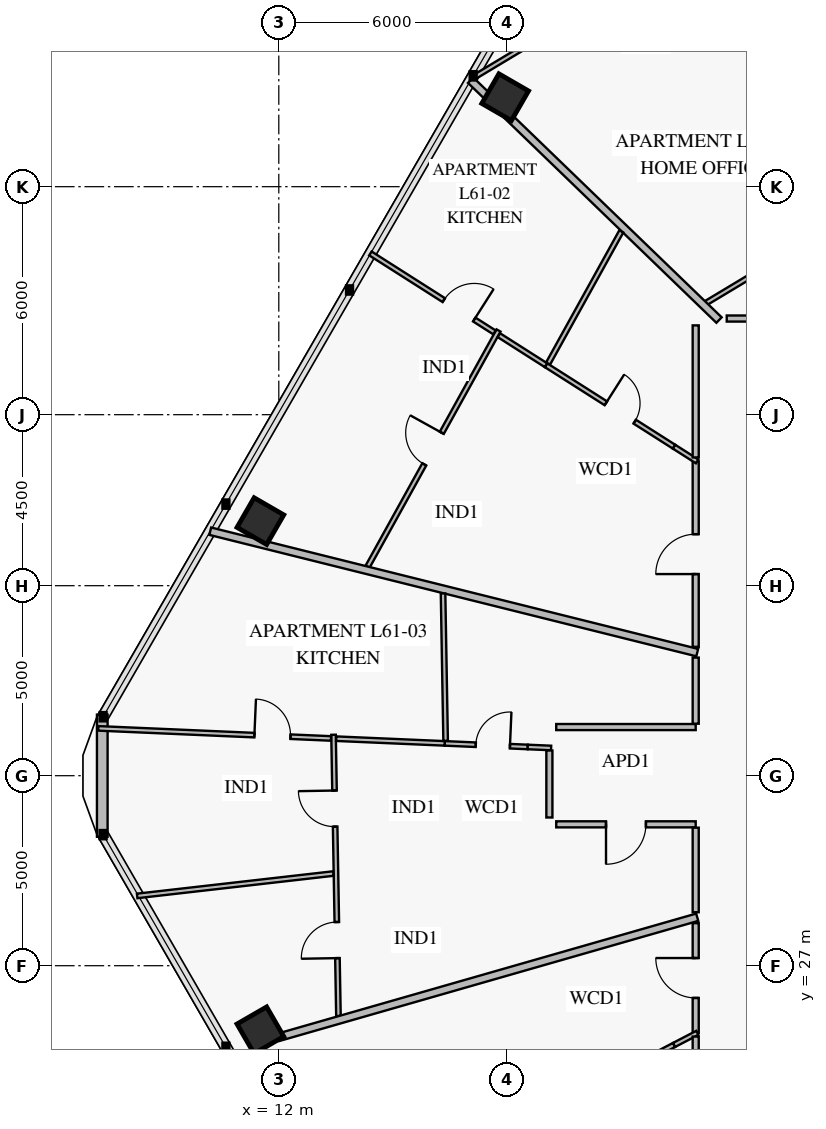
"""IFC4 building model, lengths in metres.
Left out: names, types, materials, properties, quantities, classifications, styles, units other than length and angle.
Written with IfcOpenShell. Run it as: python <this file> out.ifc"""

import sys

from ifc_helpers import new_model, si_unit, direction, frame, frame_2d, origin, origin_2d, place, context, subcontext, project, spatial, rectangle, extrude, element, fill, save


model = new_model("IFC4")
c1 = context("Model", 3, precision=1e-05, world=origin(), true_north=direction((0.0, 1.0)))
c2 = subcontext(c1, "Body", "Model", "MODEL_VIEW")
j1 = project(units=[si_unit("LENGTHUNIT", "METRE"), si_unit("PLANEANGLEUNIT", "RADIAN")], contexts=[c1])
p1 = place(None, origin())
s1 = spatial("IfcSite", under=j1, at=p1, CompositionType="ELEMENT")
p2 = place(p1, origin())
s2 = spatial("IfcBuilding", under=s1, at=p2, CompositionType="ELEMENT")
p3 = place(p2, frame((0.0, 0.0, 242.6)))
s3 = spatial("IfcBuildingStorey", under=s2, at=p3, CompositionType="ELEMENT", Elevation=242.6)
for number, where, z_axis, x_axis in (
    (1, (17.956, 49.855, 0.0), (0.0, 0.0, 1.0), (-0.5, -0.866, 0.0)),
    (2, (11.515, 38.699, 0.0), (0.0, 0.0, 1.0), (-0.5, -0.866, 0.0)),
    (3, (11.515, 25.301, 0.0), (0.0, 0.0, 1.0), (0.5, -0.866, 0.0)),
):
    element("IfcColumn", number, at=place(p3, frame(where, z_axis=z_axis, x_axis=x_axis)), inside=s3, PredefinedType="COLUMN", context=c2, shape_type="SweptSolid", body=[
        extrude(rectangle(XDim=0.9, YDim=0.9, at=origin_2d()), origin(), (0.0, 0.0, 1.0), 3.55),
    ])
p4 = place(p3, frame((7.355, 30.393, 0.0), z_axis=(0.0, 0.0, 1.0), x_axis=(0.0, 1.0, 0.0)))
e4 = element("IfcWall", 4, at=p4, inside=s3, PredefinedType="SOLIDWALL", context=c2, shape_type="SweptSolid", body=[
    extrude(rectangle(XDim=3.215, YDim=0.28, at=frame_2d((1.607, 0.0))), origin(), (0.0, 0.0, 1.0), 3.55),
])
p5 = place(p3, frame((28.011, 47.333, 0.0), z_axis=(0.0, 0.0, 1.0), x_axis=(-0.46205322058, 0.886852198143, 0.0)))
e5 = element("IfcWall", 5, at=p5, inside=s3, PredefinedType="PARTITIONING", context=c2, shape_type="SweptSolid", body=[
    extrude(rectangle(XDim=8.251, YDim=0.12, at=frame_2d((4.125, 0.0))), origin(), (0.0, 0.0, 1.0), 2.93),
])
p6 = place(p5, frame((3.625, 0.0, 0.0)))
e6 = element("IfcOpeningElement", 6, at=p6, cuts=e5, PredefinedType="OPENING", context=c2, shape_type="SweptSolid", body=[
    extrude(rectangle(XDim=0.95, YDim=2.1, at=frame_2d((0.475, 1.05))), frame((0.0, 0.072, 0.0), z_axis=(0.0, -1.0, 0.0), x_axis=(1.0, 0.0, 0.0)), (0.0, 0.0, 1.0), 0.144),
])
p7 = place(p3, frame((24.152, 54.593, 0.0), z_axis=(0.0, 0.0, 1.0), x_axis=(-0.857165830908, -0.51504052105, 0.0)))
e7 = element("IfcWall", 7, at=p7, inside=s3, PredefinedType="PARTITIONING", context=c2, shape_type="SweptSolid", body=[
    extrude(rectangle(XDim=8.171, YDim=0.12, at=frame_2d((4.085, 0.0))), origin(), (0.0, 0.0, 1.0), 3.122),
])
p8 = place(p7, frame((2.866, 0.0, 0.0)))
e8 = element("IfcOpeningElement", 8, at=p8, cuts=e7, PredefinedType="OPENING", context=c2, shape_type="SweptSolid", body=[
    extrude(rectangle(XDim=0.95, YDim=2.1, at=frame_2d((0.475, 1.05))), frame((0.0, 0.072, 0.0), z_axis=(0.0, -1.0, 0.0), x_axis=(1.0, 0.0, 0.0)), (0.0, 0.0, 1.0), 0.144),
])
p9 = place(p3, frame((17.781, 43.716, 0.0), z_axis=(0.0, 0.0, 1.0), x_axis=(-0.484799862098, -0.874625116098, 0.0)))
e9 = element("IfcWall", 9, at=p9, inside=s3, PredefinedType="PARTITIONING", context=c2, shape_type="SweptSolid", body=[
    extrude(rectangle(XDim=7.108, YDim=0.12, at=frame_2d((3.554, 0.0))), origin(), (0.0, 0.0, 1.0), 2.95),
])
p10 = place(p9, frame((3.079, 0.0, 0.0)))
e10 = element("IfcOpeningElement", 10, at=p10, cuts=e9, PredefinedType="OPENING", context=c2, shape_type="SweptSolid", body=[
    extrude(rectangle(XDim=0.95, YDim=2.1, at=frame_2d((0.475, 1.05))), frame((0.0, 0.072, 0.0), z_axis=(0.0, -1.0, 0.0), x_axis=(1.0, 0.0, 0.0)), (0.0, 0.0, 1.0), 0.144),
])
p11 = place(p3, frame((22.4, 40.657, 0.0), z_axis=(0.0, 0.0, 1.0), x_axis=(-0.843568310758, 0.537021885109, 0.0)))
e11 = element("IfcWall", 11, at=p11, inside=s3, PredefinedType="PARTITIONING", context=c2, shape_type="SweptSolid", body=[
    extrude(rectangle(XDim=3.992, YDim=0.12, at=frame_2d((1.996, 0.0))), origin(), (0.0, 0.0, 1.0), 3.15),
])
p12 = place(p11, frame((1.227, 0.0, 0.0)))
e12 = element("IfcOpeningElement", 12, at=p12, cuts=e11, PredefinedType="OPENING", context=c2, shape_type="SweptSolid", body=[
    extrude(rectangle(XDim=0.9, YDim=2.1, at=frame_2d((0.45, 1.05))), frame((0.0, 0.072, 0.0), z_axis=(0.0, -1.0, 0.0), x_axis=(1.0, 0.0, 0.0)), (0.0, 0.0, 1.0), 0.144),
])
p13 = place(p3, frame((19.032, 42.802, 0.0), z_axis=(0.0, 0.0, 1.0), x_axis=(-0.843627335813, 0.536929155727, 0.0)))
e13 = element("IfcWall", 13, at=p13, inside=s3, PredefinedType="PARTITIONING", context=c2, shape_type="SweptSolid", body=[
    extrude(rectangle(XDim=1.472, YDim=0.12, at=frame_2d((0.736, 0.0))), origin(), (0.0, 0.0, 1.0), 3.55),
])
p14 = place(p3, frame((17.676, 43.665, 0.0), z_axis=(0.0, 0.0, 1.0), x_axis=(-0.843578359507, 0.537006099939, 0.0)))
e14 = element("IfcWall", 14, at=p14, inside=s3, PredefinedType="PARTITIONING", context=c2, shape_type="SweptSolid", body=[
    extrude(rectangle(XDim=3.87, YDim=0.12, at=frame_2d((1.935, 0.0))), origin(), (0.0, 0.0, 1.0), 2.93),
])
p15 = place(p14, frame((0.631, 0.0, 0.0)))
e15 = element("IfcOpeningElement", 15, at=p15, cuts=e14, PredefinedType="OPENING", context=c2, shape_type="SweptSolid", body=[
    extrude(rectangle(XDim=0.95, YDim=2.1, at=frame_2d((0.475, 1.05))), frame((0.0, 0.072, 0.0), z_axis=(0.0, -1.0, 0.0), x_axis=(1.0, 0.0, 0.0)), (0.0, 0.0, 1.0), 0.144),
])
p16 = place(p3, frame((22.97, 40.271, 0.0), z_axis=(0.0, 0.0, 1.0), x_axis=(0.0, -1.0, 0.0)))
e16 = element("IfcWall", 16, at=p16, inside=s3, PredefinedType="PARTITIONING", context=c2, shape_type="SweptSolid", body=[
    extrude(rectangle(XDim=4.881, YDim=0.16, at=frame_2d((2.44, 0.0))), origin(), (0.0, 0.0, 1.0), 2.95),
])
p17 = place(p16, frame((1.915, 0.0, 0.0)))
e17 = element("IfcOpeningElement", 17, at=p17, cuts=e16, PredefinedType="OPENING", context=c2, shape_type="SweptSolid", body=[
    extrude(rectangle(XDim=1.05, YDim=2.15, at=frame_2d((0.525, 1.075))), frame((0.0, 0.092, 0.0), z_axis=(0.0, -1.0, 0.0), x_axis=(1.0, 0.0, 0.0)), (0.0, 0.0, 1.0), 0.184),
])
p18 = place(p3, frame((13.44, 33.077, 0.0), z_axis=(0.0, 0.0, 1.0), x_axis=(0.01747984643, -0.999847215813, 0.0)))
e18 = element("IfcWall", 18, at=p18, inside=s3, PredefinedType="PARTITIONING", context=c2, shape_type="SweptSolid", body=[
    extrude(rectangle(XDim=7.403, YDim=0.12, at=frame_2d((3.701, 0.0))), origin(), (0.0, 0.0, 1.0), 2.95),
])
p19 = place(p18, frame((1.468, 0.0, 0.0)))
e19 = element("IfcOpeningElement", 19, at=p19, cuts=e18, PredefinedType="OPENING", context=c2, shape_type="SweptSolid", body=[
    extrude(rectangle(XDim=0.95, YDim=2.1, at=frame_2d((0.475, 1.05))), frame((0.0, 0.072, 0.0), z_axis=(0.0, -1.0, 0.0), x_axis=(1.0, 0.0, 0.0)), (0.0, 0.0, 1.0), 0.144),
])
p20 = place(p18, frame((4.929, 0.0, 0.0)))
e20 = element("IfcOpeningElement", 20, at=p20, cuts=e18, PredefinedType="OPENING", context=c2, shape_type="SweptSolid", body=[
    extrude(rectangle(XDim=0.95, YDim=2.1, at=frame_2d((0.475, 1.05))), frame((0.0, 0.072, 0.0), z_axis=(0.0, -1.0, 0.0), x_axis=(1.0, 0.0, 0.0)), (0.0, 0.0, 1.0), 0.144),
])
p21 = place(p3, frame((18.55, 32.756, 0.0), z_axis=(0.0, 0.0, 1.0), x_axis=(-0.999065825158, 0.04321431478, 0.0)))
e21 = element("IfcWall", 21, at=p21, inside=s3, PredefinedType="PARTITIONING", context=c2, shape_type="SweptSolid", body=[
    extrude(rectangle(XDim=2.186, YDim=0.12, at=frame_2d((1.093, 0.0))), origin(), (0.0, 0.0, 1.0), 3.55),
])
p22 = place(p21, frame((0.468, 0.0, 0.0)))
e22 = element("IfcOpeningElement", 22, at=p22, cuts=e21, PredefinedType="OPENING", context=c2, shape_type="SweptSolid", body=[
    extrude(rectangle(XDim=0.9, YDim=2.1, at=frame_2d((0.45, 1.05))), frame((0.0, 0.072, 0.0), z_axis=(0.0, -1.0, 0.0), x_axis=(1.0, 0.0, 0.0)), (0.0, 0.0, 1.0), 0.144),
])
p23 = place(p3, frame((16.366, 32.85, 0.0), z_axis=(0.0, 0.0, 1.0), x_axis=(-0.999061951001, 0.043303788079, 0.0)))
e23 = element("IfcWall", 23, at=p23, inside=s3, PredefinedType="PARTITIONING", context=c2, shape_type="SweptSolid", body=[
    extrude(rectangle(XDim=2.858, YDim=0.12, at=frame_2d((1.429, 0.0))), origin(), (0.0, 0.0, 1.0), 3.55),
])
p24 = place(p3, frame((13.374, 32.98, 0.0), z_axis=(0.0, 0.0, 1.0), x_axis=(-0.999064479772, 0.043245407351, 0.0)))
e24 = element("IfcWall", 24, at=p24, inside=s3, PredefinedType="PARTITIONING", context=c2, shape_type="SweptSolid", body=[
    extrude(rectangle(XDim=6.131, YDim=0.12, at=frame_2d((3.065, 0.0))), origin(), (0.0, 0.0, 1.0), 2.93),
])
p25 = place(p24, frame((1.068, 0.0, 0.0)))
e25 = element("IfcOpeningElement", 25, at=p25, cuts=e24, PredefinedType="OPENING", context=c2, shape_type="SweptSolid", body=[
    extrude(rectangle(XDim=0.95, YDim=2.1, at=frame_2d((0.475, 1.05))), frame((0.0, 0.072, 0.0), z_axis=(0.0, -1.0, 0.0), x_axis=(1.0, 0.0, 0.0)), (0.0, 0.0, 1.0), 0.144),
])
p26 = place(p3, frame((19.3, 30.72, 0.0), z_axis=(0.0, 0.0, 1.0), x_axis=(1.0, 0.0, 0.0)))
e26 = element("IfcWall", 26, at=p26, inside=s3, PredefinedType="PARTITIONING", context=c2, shape_type="SweptSolid", body=[
    extrude(rectangle(XDim=3.67, YDim=0.16, at=frame_2d((1.835, 0.0))), origin(), (0.0, 0.0, 1.0), 3.55),
])
p27 = place(p26, frame((1.31, 0.0, 0.0)))
e27 = element("IfcOpeningElement", 27, at=p27, cuts=e26, PredefinedType="OPENING", context=c2, shape_type="SweptSolid", body=[
    extrude(rectangle(XDim=1.05, YDim=2.15, at=frame_2d((0.525, 1.075))), frame((0.0, 0.092, 0.0), z_axis=(0.0, -1.0, 0.0), x_axis=(1.0, 0.0, 0.0)), (0.0, 0.0, 1.0), 0.184),
])
p28 = place(p3, frame((22.4, 24.914, 0.0), z_axis=(0.0, 0.0, 1.0), x_axis=(-0.886792724396, -0.462167354926, 0.0)))
e28 = element("IfcWall", 28, at=p28, inside=s3, PredefinedType="PARTITIONING", context=c2, shape_type="SweptSolid", body=[
    extrude(rectangle(XDim=2.01, YDim=0.12, at=frame_2d((1.005, 0.0))), origin(), (0.0, 0.0, 1.0), 3.55),
])
p29 = place(p28, frame((0.394, 0.0, 0.0)))
e29 = element("IfcOpeningElement", 29, at=p29, cuts=e28, PredefinedType="OPENING", context=c2, shape_type="SweptSolid", body=[
    extrude(rectangle(XDim=0.9, YDim=2.1, at=frame_2d((0.45, 1.05))), frame((0.0, 0.072, 0.0), z_axis=(0.0, -1.0, 0.0), x_axis=(1.0, 0.0, 0.0)), (0.0, 0.0, 1.0), 0.144),
])
p30 = place(p3, frame((22.97, 28.119, 0.0), z_axis=(0.0, 0.0, 1.0), x_axis=(0.0, -1.0, 0.0)))
e30 = element("IfcWall", 30, at=p30, inside=s3, PredefinedType="PARTITIONING", context=c2, shape_type="SweptSolid", body=[
    extrude(rectangle(XDim=2.885, YDim=0.16, at=frame_2d((1.443, 0.0))), origin(), (0.0, 0.0, 1.0), 3.55),
])
p31 = place(p30, frame((0.918, 0.0, 0.0)))
e31 = element("IfcOpeningElement", 31, at=p31, cuts=e30, PredefinedType="OPENING", context=c2, shape_type="SweptSolid", body=[
    extrude(rectangle(XDim=1.05, YDim=2.15, at=frame_2d((0.525, 1.075))), frame((0.0, 0.092, 0.0), z_axis=(0.0, -1.0, 0.0), x_axis=(1.0, 0.0, 0.0)), (0.0, 0.0, 1.0), 0.184),
])
p32 = place(p3, frame((27.964, 47.276, 0.0), z_axis=(0.0, 0.0, 1.0), x_axis=(-0.857162223485, -0.515046524724, 0.0)))
e32 = element("IfcWall", 32, at=p32, inside=s3, PredefinedType="PARTITIONING", context=c2, shape_type="SweptSolid", body=[
    extrude(rectangle(XDim=5.54, YDim=0.12, at=frame_2d((2.77, 0.0))), origin(), (0.0, 0.0, 1.0), 2.95),
])
p33 = place(p3, frame((23.584, 43.99, 0.0), z_axis=(0.0, 0.0, 1.0), x_axis=(-0.719338080926, 0.694660150958, 0.0)))
e33 = element("IfcWall", 33, at=p33, inside=s3, PredefinedType="PARTITIONING", context=c2, shape_type="SweptSolid", body=[
    extrude(rectangle(XDim=7.766, YDim=0.2, at=frame_2d((3.883, 0.0))), origin(), (0.0, 0.0, 1.0), 2.95),
])
p34 = place(p3, frame((17.486, 49.878, 0.0), z_axis=(0.0, 0.0, 1.0), x_axis=(-0.719422178176, 0.694573055587, 0.0)))
e34 = element("IfcWall", 34, at=p34, inside=s3, PredefinedType="PARTITIONING", context=c2, shape_type="SweptSolid", body=[
    extrude(rectangle(XDim=0.609, YDim=0.2, at=frame_2d((0.305, 0.0))), origin(), (0.0, 0.0, 1.0), 3.55),
])
p35 = place(p3, frame((23.007, 40.271, 0.0), z_axis=(0.0, 0.0, 1.0), x_axis=(-0.843703375108, 0.536809663503, 0.0)))
e35 = element("IfcWall", 35, at=p35, inside=s3, PredefinedType="PARTITIONING", context=c2, shape_type="SweptSolid", body=[
    extrude(rectangle(XDim=0.72, YDim=0.12, at=frame_2d((0.36, 0.0))), origin(), (0.0, 0.0, 1.0), 3.55),
])
p36 = place(p3, frame((21.013, 46.323, 0.0), z_axis=(0.0, 0.0, 1.0), x_axis=(-0.484828920672, -0.874609008461, 0.0)))
e36 = element("IfcWall", 36, at=p36, inside=s3, PredefinedType="PARTITIONING", context=c2, shape_type="SweptSolid", body=[
    extrude(rectangle(XDim=3.974, YDim=0.12, at=frame_2d((1.987, 0.0))), origin(), (0.0, 0.0, 1.0), 3.55),
])
p37 = place(p3, frame((23.01, 35.239, 0.0), z_axis=(0.0, 0.0, 1.0), x_axis=(-0.970296722433, 0.241917900197, 0.0)))
e37 = element("IfcWall", 37, at=p37, inside=s3, PredefinedType="PARTITIONING", context=c2, shape_type="SweptSolid", body=[
    extrude(rectangle(XDim=13.206, YDim=0.2, at=frame_2d((6.603, 0.0))), origin(), (0.0, 0.0, 1.0), 2.93),
])
p38 = place(p3, frame((13.436, 29.425, 0.0), z_axis=(0.0, 0.0, 1.0), x_axis=(-0.99355159017, -0.11338094051, 0.0)))
e38 = element("IfcWall", 38, at=p38, inside=s3, PredefinedType="PARTITIONING", context=c2, shape_type="SweptSolid", body=[
    extrude(rectangle(XDim=5.196, YDim=0.12, at=frame_2d((2.598, 0.0))), origin(), (0.0, 0.0, 1.0), 2.93),
])
p39 = place(p3, frame((19.165, 32.729, 0.0), z_axis=(0.0, 0.0, 1.0), x_axis=(-0.999047908993, 0.043626546244, 0.0)))
e39 = element("IfcWall", 39, at=p39, inside=s3, PredefinedType="PARTITIONING", context=c2, shape_type="SweptSolid", body=[
    extrude(rectangle(XDim=0.615, YDim=0.12, at=frame_2d((0.308, 0.0))), origin(), (0.0, 0.0, 1.0), 3.55),
])
p40 = place(p3, frame((16.322, 36.795, 0.0), z_axis=(0.0, 0.0, 1.0), x_axis=(0.017438476192, -0.999847938213, 0.0)))
e40 = element("IfcWall", 40, at=p40, inside=s3, PredefinedType="PARTITIONING", context=c2, shape_type="SweptSolid", body=[
    extrude(rectangle(XDim=3.878, YDim=0.12, at=frame_2d((1.939, 0.0))), origin(), (0.0, 0.0, 1.0), 3.55),
])
p41 = place(p3, frame((23.01, 28.275, 0.0), z_axis=(0.0, 0.0, 1.0), x_axis=(-0.961263244987, -0.275631953585, 0.0)))
e41 = element("IfcWall", 41, at=p41, inside=s3, PredefinedType="PARTITIONING", context=c2, shape_type="SweptSolid", body=[
    extrude(rectangle(XDim=11.469, YDim=0.2, at=frame_2d((5.734, 0.0))), origin(), (0.0, 0.0, 1.0), 2.95),
])
p42 = place(p3, frame((23.012, 25.233, 0.0), z_axis=(0.0, 0.0, 1.0), x_axis=(-0.886950303541, -0.461864870983, 0.0)))
e42 = element("IfcWall", 42, at=p42, inside=s3, PredefinedType="PARTITIONING", context=c2, shape_type="SweptSolid", body=[
    extrude(rectangle(XDim=0.69, YDim=0.12, at=frame_2d((0.345, 0.0))), origin(), (0.0, 0.0, 1.0), 3.55),
])
p43 = place(p3, frame((29.656, 44.03, 0.0), z_axis=(0.0, 0.0, 1.0), x_axis=(-1.0, 0.0, 0.0)))
e43 = element("IfcWall", 43, at=p43, inside=s3, PredefinedType="PARTITIONING", context=c2, shape_type="SweptSolid", body=[
    extrude(rectangle(XDim=5.869, YDim=0.16, at=frame_2d((2.935, 0.0))), origin(), (0.0, 0.0, 1.0), 2.95),
])
p44 = place(p3, frame((22.97, 43.85, 0.0), z_axis=(0.0, 0.0, 1.0), x_axis=(0.0, -1.0, 0.0)))
e44 = element("IfcWall", 44, at=p44, inside=s3, PredefinedType="PARTITIONING", context=c2, shape_type="SweptSolid", body=[
    extrude(rectangle(XDim=3.475, YDim=0.16, at=frame_2d((1.737, 0.0))), origin(), (0.0, 0.0, 1.0), 3.55),
])
p45 = place(p3, frame((22.97, 30.632, 0.0), z_axis=(0.0, 0.0, 1.0), x_axis=(0.0, -1.0, 0.0)))
e45 = element("IfcWall", 45, at=p45, inside=s3, PredefinedType="PARTITIONING", context=c2, shape_type="SweptSolid", body=[
    extrude(rectangle(XDim=2.225, YDim=0.16, at=frame_2d((1.112, 0.0))), origin(), (0.0, 0.0, 1.0), 2.95),
])
p46 = place(p3, frame((19.12, 32.663, 0.0), z_axis=(0.0, 0.0, 1.0), x_axis=(0.0, -1.0, 0.0)))
e46 = element("IfcWall", 46, at=p46, inside=s3, PredefinedType="PARTITIONING", context=c2, shape_type="SweptSolid", body=[
    extrude(rectangle(XDim=1.763, YDim=0.16, at=frame_2d((0.882, 0.0))), origin(), (0.0, 0.0, 1.0), 3.55),
])
p47 = place(p3, frame((22.97, 33.28, 0.0), z_axis=(0.0, 0.0, 1.0), x_axis=(-1.0, 0.0, 0.0)))
e47 = element("IfcWall", 47, at=p47, inside=s3, PredefinedType="PARTITIONING", context=c2, shape_type="SweptSolid", body=[
    extrude(rectangle(XDim=3.67, YDim=0.16, at=frame_2d((1.835, 0.0))), origin(), (0.0, 0.0, 1.0), 3.55),
])
p48 = place(p3, frame((22.97, 35.108, 0.0), z_axis=(0.0, 0.0, 1.0), x_axis=(0.0, -1.0, 0.0)))
e48 = element("IfcWall", 48, at=p48, inside=s3, PredefinedType="PARTITIONING", context=c2, shape_type="SweptSolid", body=[
    extrude(rectangle(XDim=1.74, YDim=0.16, at=frame_2d((0.87, 0.0))), origin(), (0.0, 0.0, 1.0), 3.55),
])
p49 = place(p3, frame((22.97, 25.135, 0.0), z_axis=(0.0, 0.0, 1.0), x_axis=(0.0, -1.0, 0.0)))
e49 = element("IfcWall", 49, at=p49, inside=s3, PredefinedType="PARTITIONING", context=c2, shape_type="SweptSolid", body=[
    extrude(rectangle(XDim=4.883, YDim=0.16, at=frame_2d((2.441, 0.0))), origin(), (0.0, 0.0, 1.0), 3.55),
])
p50 = place(p10, frame((0.95, 0.0, 0.0), z_axis=(0.0, 0.0, 1.0), x_axis=(-1.0, 0.0, 0.0)))
e50 = element("IfcDoor", 50, at=p50, inside=s3, OperationType="SINGLE_SWING_RIGHT", PredefinedType="DOOR", context=c2, shape_type="SweptSolid", body=[
    extrude(rectangle(XDim=0.95, YDim=2.1, at=frame_2d((0.475, 1.05))), frame((0.0, 0.025, 0.0), z_axis=(0.0, -1.0, 0.0), x_axis=(1.0, 0.0, 0.0)), (0.0, 0.0, 1.0), 0.05),
])
fill(e10, e50)
p51 = place(p12, frame((0.9, 0.0, 0.0), z_axis=(0.0, 0.0, 1.0), x_axis=(-1.0, 0.0, 0.0)))
e51 = element("IfcDoor", 51, at=p51, inside=s3, OperationType="SINGLE_SWING_LEFT", PredefinedType="DOOR", context=c2, shape_type="SweptSolid", body=[
    extrude(rectangle(XDim=0.9, YDim=2.1, at=frame_2d((0.45, 1.05))), frame((0.0, 0.025, 0.0), z_axis=(0.0, -1.0, 0.0), x_axis=(1.0, 0.0, 0.0)), (0.0, 0.0, 1.0), 0.05),
])
fill(e12, e51)
p52 = place(p15, frame((0.95, 0.0, 0.0), z_axis=(0.0, 0.0, 1.0), x_axis=(-1.0, 0.0, 0.0)))
e52 = element("IfcDoor", 52, at=p52, inside=s3, OperationType="SINGLE_SWING_RIGHT", PredefinedType="DOOR", context=c2, shape_type="SweptSolid", body=[
    extrude(rectangle(XDim=0.95, YDim=2.1, at=frame_2d((0.475, 1.05))), frame((0.0, 0.025, 0.0), z_axis=(0.0, -1.0, 0.0), x_axis=(1.0, 0.0, 0.0)), (0.0, 0.0, 1.0), 0.05),
])
fill(e15, e52)
p53 = place(p17, frame((1.05, 0.0, 0.0), z_axis=(0.0, 0.0, 1.0), x_axis=(-1.0, 0.0, 0.0)))
e53 = element("IfcDoor", 53, at=p53, inside=s3, OperationType="SINGLE_SWING_LEFT", PredefinedType="DOOR", context=c2, shape_type="SweptSolid", body=[
    extrude(rectangle(XDim=1.05, YDim=2.15, at=frame_2d((0.525, 1.075))), frame((0.0, 0.025, 0.0), z_axis=(0.0, -1.0, 0.0), x_axis=(1.0, 0.0, 0.0)), (0.0, 0.0, 1.0), 0.05),
])
fill(e17, e53)
p54 = place(p19, frame((0.95, 0.0, 0.0), z_axis=(0.0, 0.0, 1.0), x_axis=(-1.0, 0.0, 0.0)))
e54 = element("IfcDoor", 54, at=p54, inside=s3, OperationType="SINGLE_SWING_RIGHT", PredefinedType="DOOR", context=c2, shape_type="SweptSolid", body=[
    extrude(rectangle(XDim=0.95, YDim=2.1, at=frame_2d((0.475, 1.05))), frame((0.0, 0.025, 0.0), z_axis=(0.0, -1.0, 0.0), x_axis=(1.0, 0.0, 0.0)), (0.0, 0.0, 1.0), 0.05),
])
fill(e19, e54)
p55 = place(p20, frame((0.95, 0.0, 0.0), z_axis=(0.0, 0.0, 1.0), x_axis=(-1.0, 0.0, 0.0)))
e55 = element("IfcDoor", 55, at=p55, inside=s3, OperationType="SINGLE_SWING_LEFT", PredefinedType="DOOR", context=c2, shape_type="SweptSolid", body=[
    extrude(rectangle(XDim=0.95, YDim=2.1, at=frame_2d((0.475, 1.05))), frame((0.0, 0.025, 0.0), z_axis=(0.0, -1.0, 0.0), x_axis=(1.0, 0.0, 0.0)), (0.0, 0.0, 1.0), 0.05),
])
fill(e20, e55)
p56 = place(p22, frame((0.9, 0.0, 0.0), z_axis=(0.0, 0.0, 1.0), x_axis=(-1.0, 0.0, 0.0)))
e56 = element("IfcDoor", 56, at=p56, inside=s3, OperationType="SINGLE_SWING_RIGHT", PredefinedType="DOOR", context=c2, shape_type="SweptSolid", body=[
    extrude(rectangle(XDim=0.9, YDim=2.1, at=frame_2d((0.45, 1.05))), frame((0.0, 0.025, 0.0), z_axis=(0.0, -1.0, 0.0), x_axis=(1.0, 0.0, 0.0)), (0.0, 0.0, 1.0), 0.05),
])
fill(e22, e56)
p57 = place(p25, frame((0.95, 0.0, 0.0), z_axis=(0.0, 0.0, 1.0), x_axis=(-1.0, 0.0, 0.0)))
e57 = element("IfcDoor", 57, at=p57, inside=s3, OperationType="SINGLE_SWING_LEFT", PredefinedType="DOOR", context=c2, shape_type="SweptSolid", body=[
    extrude(rectangle(XDim=0.95, YDim=2.1, at=frame_2d((0.475, 1.05))), frame((0.0, 0.025, 0.0), z_axis=(0.0, -1.0, 0.0), x_axis=(1.0, 0.0, 0.0)), (0.0, 0.0, 1.0), 0.05),
])
fill(e25, e57)
p58 = place(p27, frame((1.05, 0.0, 0.0), z_axis=(0.0, 0.0, 1.0), x_axis=(-1.0, 0.0, 0.0)))
e58 = element("IfcDoor", 58, at=p58, inside=s3, OperationType="SINGLE_SWING_RIGHT", PredefinedType="DOOR", context=c2, shape_type="SweptSolid", body=[
    extrude(rectangle(XDim=1.05, YDim=2.15, at=frame_2d((0.525, 1.075))), frame((0.0, 0.025, 0.0), z_axis=(0.0, -1.0, 0.0), x_axis=(1.0, 0.0, 0.0)), (0.0, 0.0, 1.0), 0.05),
])
fill(e27, e58)
p59 = place(p31, frame((1.05, 0.0, 0.0), z_axis=(0.0, 0.0, 1.0), x_axis=(-1.0, 0.0, 0.0)))
e59 = element("IfcDoor", 59, at=p59, inside=s3, OperationType="SINGLE_SWING_RIGHT", PredefinedType="DOOR", context=c2, shape_type="SweptSolid", body=[
    extrude(rectangle(XDim=1.05, YDim=2.15, at=frame_2d((0.525, 1.075))), frame((0.0, 0.025, 0.0), z_axis=(0.0, -1.0, 0.0), x_axis=(1.0, 0.0, 0.0)), (0.0, 0.0, 1.0), 0.05),
])
fill(e31, e59)
save(model, sys.argv[1])
